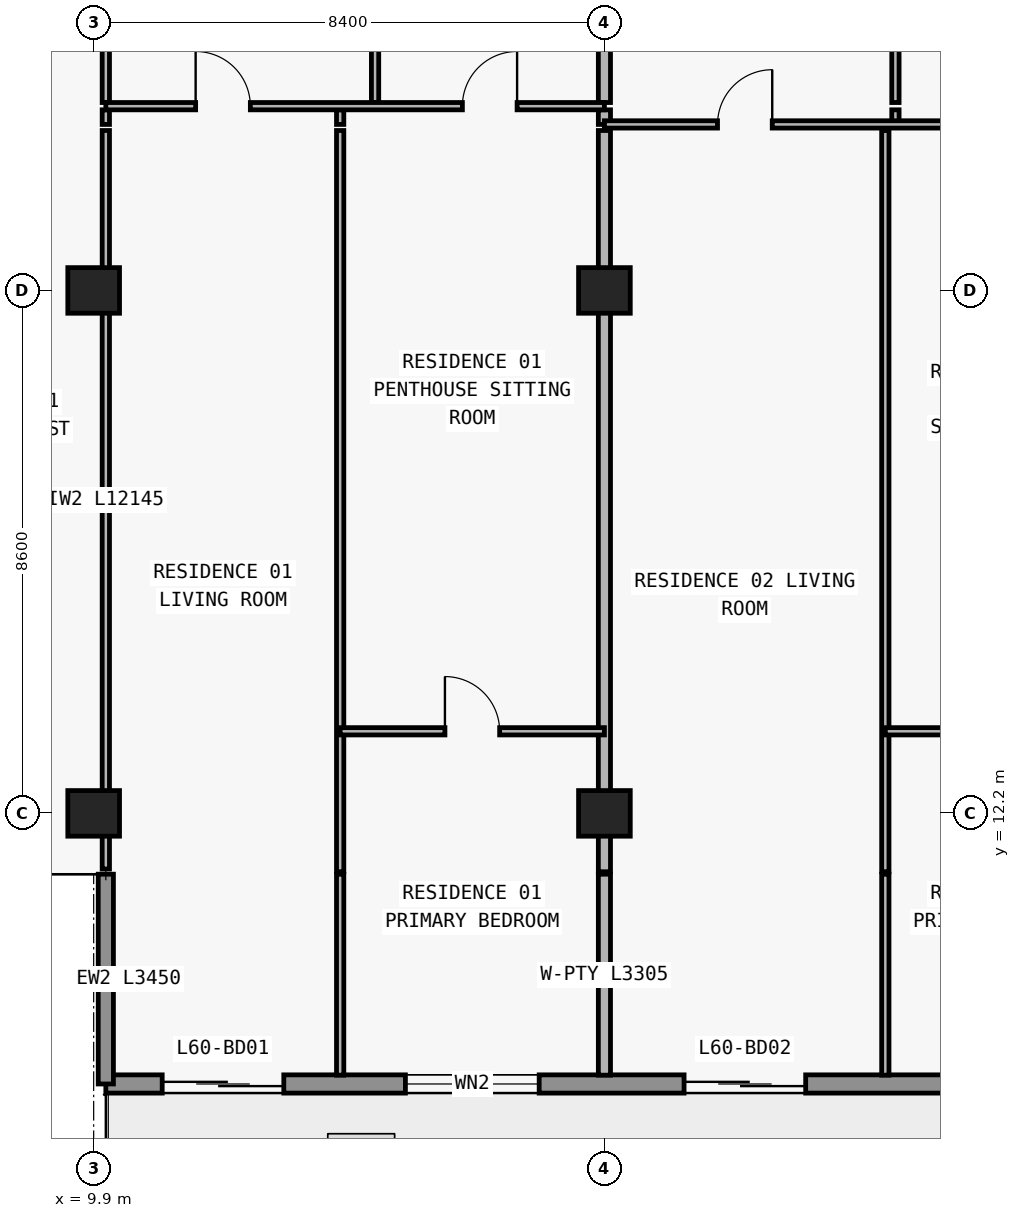
"""IFC4 building model, lengths in metres.
Left out: names, types, materials, properties, quantities, classifications, styles, units other than length and angle.
Written with IfcOpenShell. Run it as: python <this file> out.ifc"""

import sys

from ifc_helpers import new_model, si_unit, direction, frame, frame_2d, origin, origin_2d, place, context, subcontext, project, spatial, rectangle, extrude, element, fill, save


model = new_model("IFC4")
c1 = context("Model", 3, precision=1e-05, world=origin(), true_north=direction((0.0, 1.0)))
c2 = subcontext(c1, "Body", "Model", "MODEL_VIEW")
j1 = project(units=[si_unit("LENGTHUNIT", "METRE"), si_unit("PLANEANGLEUNIT", "RADIAN")], contexts=[c1])
p1 = place(None, origin())
s1 = spatial("IfcSite", under=j1, at=p1, CompositionType="ELEMENT")
p2 = place(p1, origin())
s2 = spatial("IfcBuilding", under=s1, at=p2, CompositionType="ELEMENT")
p3 = place(p2, frame((0.0, 0.0, 214.8)))
s3 = spatial("IfcBuildingStorey", under=s2, at=p3, CompositionType="ELEMENT", Elevation=214.8)
for number, where, z_axis, x_axis in (
    (1, (9.9, 12.2, 0.0), (0.0, 0.0, 1.0), (1.0, 0.0, 0.0)),
    (2, (18.3, 12.2, 0.0), (0.0, 0.0, 1.0), (1.0, 0.0, 0.0)),
    (3, (9.9, 20.8, 0.0), (0.0, 0.0, 1.0), (1.0, 0.0, 0.0)),
    (4, (18.3, 20.8, 0.0), (0.0, 0.0, 1.0), (1.0, 0.0, 0.0)),
):
    element("IfcColumn", number, at=place(p3, frame(where, z_axis=z_axis, x_axis=x_axis)), inside=s3, PredefinedType="COLUMN", context=c2, shape_type="SweptSolid", body=[
        extrude(rectangle(XDim=0.85, YDim=0.75, at=origin_2d()), origin(), (0.0, 0.0, 1.0), 3.05),
    ])
p4 = place(p3, frame((67.7, 7.75, 0.0), z_axis=(0.0, 0.0, 1.0), x_axis=(-1.0, 0.0, 0.0)))
e5 = element("IfcWall", 5, at=p4, inside=s3, PredefinedType="STANDARD", context=c2, shape_type="SweptSolid", body=[
    extrude(rectangle(XDim=57.6, YDim=0.3, at=frame_2d((28.8, 0.0))), origin(), (0.0, 0.0, 1.0), 3.05),
])
p5 = place(p4, frame((54.673, 0.0, 0.0)))
e6 = element("IfcOpeningElement", 6, at=p5, cuts=e5, PredefinedType="OPENING", context=c2, shape_type="SweptSolid", body=[
    extrude(rectangle(XDim=2.0, YDim=2.3, at=frame_2d((1.0, 1.15))), frame((0.0, 0.16, 0.0), z_axis=(0.0, -1.0, 0.0), x_axis=(1.0, 0.0, 0.0)), (0.0, 0.0, 1.0), 0.32),
])
p6 = place(p4, frame((50.473, 0.0, 0.85)))
e7 = element("IfcOpeningElement", 7, at=p6, cuts=e5, PredefinedType="OPENING", context=c2, shape_type="SweptSolid", body=[
    extrude(rectangle(XDim=2.2, YDim=1.55, at=frame_2d((1.1, 0.775))), frame((0.0, 0.16, 0.0), z_axis=(0.0, -1.0, 0.0), x_axis=(1.0, 0.0, 0.0)), (0.0, 0.0, 1.0), 0.32),
])
p7 = place(p4, frame((46.09, 0.0, 0.0)))
e8 = element("IfcOpeningElement", 8, at=p7, cuts=e5, PredefinedType="OPENING", context=c2, shape_type="SweptSolid", body=[
    extrude(rectangle(XDim=2.0, YDim=2.3, at=frame_2d((1.0, 1.15))), frame((0.0, 0.16, 0.0), z_axis=(0.0, -1.0, 0.0), x_axis=(1.0, 0.0, 0.0)), (0.0, 0.0, 1.0), 0.32),
])
p8 = place(p4, frame((41.99, 0.0, 0.85)))
e9 = element("IfcOpeningElement", 9, at=p8, cuts=e5, PredefinedType="OPENING", context=c2, shape_type="SweptSolid", body=[
    extrude(rectangle(XDim=1.8, YDim=1.55, at=frame_2d((0.9, 0.775))), frame((0.0, 0.16, 0.0), z_axis=(0.0, -1.0, 0.0), x_axis=(1.0, 0.0, 0.0)), (0.0, 0.0, 1.0), 0.32),
])
p9 = place(p4, frame((38.026, 0.0, 0.0)))
e10 = element("IfcOpeningElement", 10, at=p9, cuts=e5, PredefinedType="OPENING", context=c2, shape_type="SweptSolid", body=[
    extrude(rectangle(XDim=2.0, YDim=2.3, at=frame_2d((1.0, 1.15))), frame((0.0, 0.16, 0.0), z_axis=(0.0, -1.0, 0.0), x_axis=(1.0, 0.0, 0.0)), (0.0, 0.0, 1.0), 0.32),
])
p10 = place(p4, frame((33.726, 0.0, 0.85)))
e11 = element("IfcOpeningElement", 11, at=p10, cuts=e5, PredefinedType="OPENING", context=c2, shape_type="SweptSolid", body=[
    extrude(rectangle(XDim=2.2, YDim=1.55, at=frame_2d((1.1, 0.775))), frame((0.0, 0.16, 0.0), z_axis=(0.0, -1.0, 0.0), x_axis=(1.0, 0.0, 0.0)), (0.0, 0.0, 1.0), 0.32),
])
p11 = place(p4, frame((29.51, 0.0, 0.0)))
e12 = element("IfcOpeningElement", 12, at=p11, cuts=e5, PredefinedType="OPENING", context=c2, shape_type="SweptSolid", body=[
    extrude(rectangle(XDim=2.0, YDim=2.3, at=frame_2d((1.0, 1.15))), frame((0.0, 0.16, 0.0), z_axis=(0.0, -1.0, 0.0), x_axis=(1.0, 0.0, 0.0)), (0.0, 0.0, 1.0), 0.32),
])
p12 = place(p4, frame((25.81, 0.0, 0.85)))
e13 = element("IfcOpeningElement", 13, at=p12, cuts=e5, PredefinedType="OPENING", context=c2, shape_type="SweptSolid", body=[
    extrude(rectangle(XDim=1.8, YDim=1.55, at=frame_2d((0.9, 0.775))), frame((0.0, 0.16, 0.0), z_axis=(0.0, -1.0, 0.0), x_axis=(1.0, 0.0, 0.0)), (0.0, 0.0, 1.0), 0.32),
])
p13 = place(p4, frame((22.026, 0.0, 0.0)))
e14 = element("IfcOpeningElement", 14, at=p13, cuts=e5, PredefinedType="OPENING", context=c2, shape_type="SweptSolid", body=[
    extrude(rectangle(XDim=2.0, YDim=2.3, at=frame_2d((1.0, 1.15))), frame((0.0, 0.16, 0.0), z_axis=(0.0, -1.0, 0.0), x_axis=(1.0, 0.0, 0.0)), (0.0, 0.0, 1.0), 0.32),
])
p14 = place(p4, frame((17.726, 0.0, 0.85)))
e15 = element("IfcOpeningElement", 15, at=p14, cuts=e5, PredefinedType="OPENING", context=c2, shape_type="SweptSolid", body=[
    extrude(rectangle(XDim=2.2, YDim=1.55, at=frame_2d((1.1, 0.775))), frame((0.0, 0.16, 0.0), z_axis=(0.0, -1.0, 0.0), x_axis=(1.0, 0.0, 0.0)), (0.0, 0.0, 1.0), 0.32),
])
p15 = place(p4, frame((13.29, 0.0, 0.0)))
e16 = element("IfcOpeningElement", 16, at=p15, cuts=e5, PredefinedType="OPENING", context=c2, shape_type="SweptSolid", body=[
    extrude(rectangle(XDim=2.0, YDim=2.3, at=frame_2d((1.0, 1.15))), frame((0.0, 0.16, 0.0), z_axis=(0.0, -1.0, 0.0), x_axis=(1.0, 0.0, 0.0)), (0.0, 0.0, 1.0), 0.32),
])
p16 = place(p4, frame((9.19, 0.0, 0.85)))
e17 = element("IfcOpeningElement", 17, at=p16, cuts=e5, PredefinedType="OPENING", context=c2, shape_type="SweptSolid", body=[
    extrude(rectangle(XDim=1.8, YDim=1.55, at=frame_2d((0.9, 0.775))), frame((0.0, 0.16, 0.0), z_axis=(0.0, -1.0, 0.0), x_axis=(1.0, 0.0, 0.0)), (0.0, 0.0, 1.0), 0.32),
])
p17 = place(p4, frame((5.273, 0.0, 0.0)))
e18 = element("IfcOpeningElement", 18, at=p17, cuts=e5, PredefinedType="OPENING", context=c2, shape_type="SweptSolid", body=[
    extrude(rectangle(XDim=2.0, YDim=2.3, at=frame_2d((1.0, 1.15))), frame((0.0, 0.16, 0.0), z_axis=(0.0, -1.0, 0.0), x_axis=(1.0, 0.0, 0.0)), (0.0, 0.0, 1.0), 0.32),
])
p18 = place(p4, frame((1.073, 0.0, 0.85)))
e19 = element("IfcOpeningElement", 19, at=p18, cuts=e5, PredefinedType="OPENING", context=c2, shape_type="SweptSolid", body=[
    extrude(rectangle(XDim=2.2, YDim=1.55, at=frame_2d((1.1, 0.775))), frame((0.0, 0.16, 0.0), z_axis=(0.0, -1.0, 0.0), x_axis=(1.0, 0.0, 0.0)), (0.0, 0.0, 1.0), 0.32),
])
p19 = place(p3, frame((10.1, 11.2, 0.0), z_axis=(0.0, 0.0, 1.0), x_axis=(0.0, -1.0, 0.0)))
e20 = element("IfcWall", 20, at=p19, inside=s3, PredefinedType="ELEMENTEDWALL", context=c2, shape_type="SweptSolid", body=[
    extrude(rectangle(XDim=3.45, YDim=0.25, at=frame_2d((1.725, 0.0))), origin(), (0.0, 0.0, 1.0), 3.05),
])
p20 = place(p3, frame((10.1, 11.285, 0.0), z_axis=(0.0, 0.0, 1.0), x_axis=(0.0, 1.0, 0.0)))
e21 = element("IfcWall", 21, at=p20, inside=s3, PredefinedType="PARTITIONING", context=c2, shape_type="SweptSolid", body=[
    extrude(rectangle(XDim=12.145, YDim=0.12, at=frame_2d((6.073, 0.0))), origin(), (0.0, 0.0, 1.0), 2.263),
])
p21 = place(p3, frame((10.1, 23.53, 0.0), z_axis=(0.0, 0.0, 1.0), x_axis=(0.0, 1.0, 0.0)))
e22 = element("IfcWall", 22, at=p21, inside=s3, PredefinedType="PARTITIONING", context=c2, shape_type="SweptSolid", body=[
    extrude(rectangle(XDim=0.24, YDim=0.12, at=frame_2d((0.12, 0.0))), origin(), (0.0, 0.0, 1.0), 2.263),
])
p22 = place(p3, frame((10.1, 23.89, 0.0), z_axis=(0.0, 0.0, 1.0), x_axis=(0.0, 1.0, 0.0)))
e23 = element("IfcWall", 23, at=p22, inside=s3, PredefinedType="PARTITIONING", context=c2, shape_type="SweptSolid", body=[
    extrude(rectangle(XDim=4.69, YDim=0.12, at=frame_2d((2.345, 0.0))), origin(), (0.0, 0.0, 1.0), 2.263),
])
p23 = place(p22, frame((1.895, 0.0, 0.0)))
e24 = element("IfcOpeningElement", 24, at=p23, cuts=e23, PredefinedType="OPENING", context=c2, shape_type="SweptSolid", body=[
    extrude(rectangle(XDim=0.9, YDim=2.15, at=frame_2d((0.45, 1.075))), frame((0.0, 0.07, 0.0), z_axis=(0.0, -1.0, 0.0), x_axis=(1.0, 0.0, 0.0)), (0.0, 0.0, 1.0), 0.14),
])
p24 = place(p3, frame((13.954, 7.895, 0.0), z_axis=(0.0, 0.0, 1.0), x_axis=(0.0, 1.0, 0.0)))
e25 = element("IfcWall", 25, at=p24, inside=s3, PredefinedType="PARTITIONING", context=c2, shape_type="SweptSolid", body=[
    extrude(rectangle(XDim=3.305, YDim=0.12, at=frame_2d((1.652, 0.0))), origin(), (0.0, 0.0, 1.0), 3.05),
])
p25 = place(p3, frame((13.954, 11.24, 0.0), z_axis=(0.0, 0.0, 1.0), x_axis=(0.0, 1.0, 0.0)))
e26 = element("IfcWall", 26, at=p25, inside=s3, PredefinedType="PARTITIONING", context=c2, shape_type="SweptSolid", body=[
    extrude(rectangle(XDim=12.19, YDim=0.12, at=frame_2d((6.095, 0.0))), origin(), (0.0, 0.0, 1.0), 3.05),
])
p26 = place(p3, frame((13.954, 23.53, 0.0), z_axis=(0.0, 0.0, 1.0), x_axis=(0.0, 1.0, 0.0)))
e27 = element("IfcWall", 27, at=p26, inside=s3, PredefinedType="PARTITIONING", context=c2, shape_type="SweptSolid", body=[
    extrude(rectangle(XDim=0.24, YDim=0.12, at=frame_2d((0.12, 0.0))), origin(), (0.0, 0.0, 1.0), 3.05),
])
p27 = place(p3, frame((14.528, 23.89, 0.0), z_axis=(0.0, 0.0, 1.0), x_axis=(0.0, 1.0, 0.0)))
e28 = element("IfcWall", 28, at=p27, inside=s3, PredefinedType="PARTITIONING", context=c2, shape_type="SweptSolid", body=[
    extrude(rectangle(XDim=4.69, YDim=0.12, at=frame_2d((2.345, 0.0))), origin(), (0.0, 0.0, 1.0), 3.05),
])
p28 = place(p27, frame((1.895, 0.0, 0.0)))
e29 = element("IfcOpeningElement", 29, at=p28, cuts=e28, PredefinedType="OPENING", context=c2, shape_type="SweptSolid", body=[
    extrude(rectangle(XDim=0.9, YDim=2.15, at=frame_2d((0.45, 1.075))), frame((0.0, 0.07, 0.0), z_axis=(0.0, -1.0, 0.0), x_axis=(1.0, 0.0, 0.0)), (0.0, 0.0, 1.0), 0.14),
])
p29 = place(p3, frame((18.3, 7.895, 0.0), z_axis=(0.0, 0.0, 1.0), x_axis=(0.0, 1.0, 0.0)))
e30 = element("IfcWall", 30, at=p29, inside=s3, PredefinedType="PARTITIONING", context=c2, shape_type="SweptSolid", body=[
    extrude(rectangle(XDim=3.305, YDim=0.2, at=frame_2d((1.652, 0.0))), origin(), (0.0, 0.0, 1.0), 3.05),
])
p30 = place(p3, frame((18.3, 11.24, 0.0), z_axis=(0.0, 0.0, 1.0), x_axis=(0.0, 1.0, 0.0)))
e31 = element("IfcWall", 31, at=p30, inside=s3, PredefinedType="PARTITIONING", context=c2, shape_type="SweptSolid", body=[
    extrude(rectangle(XDim=12.19, YDim=0.2, at=frame_2d((6.095, 0.0))), origin(), (0.0, 0.0, 1.0), 2.263),
])
p31 = place(p3, frame((18.3, 23.53, 0.0), z_axis=(0.0, 0.0, 1.0), x_axis=(0.0, 1.0, 0.0)))
e32 = element("IfcWall", 32, at=p31, inside=s3, PredefinedType="PARTITIONING", context=c2, shape_type="SweptSolid", body=[
    extrude(rectangle(XDim=0.24, YDim=0.2, at=frame_2d((0.12, 0.0))), origin(), (0.0, 0.0, 1.0), 2.263),
])
p32 = place(p3, frame((18.3, 23.89, 0.0), z_axis=(0.0, 0.0, 1.0), x_axis=(0.0, 1.0, 0.0)))
e33 = element("IfcWall", 33, at=p32, inside=s3, PredefinedType="PARTITIONING", context=c2, shape_type="SweptSolid", body=[
    extrude(rectangle(XDim=4.69, YDim=0.2, at=frame_2d((2.345, 0.0))), origin(), (0.0, 0.0, 1.0), 2.263),
])
p33 = place(p3, frame((22.92, 7.895, 0.0), z_axis=(0.0, 0.0, 1.0), x_axis=(0.0, 1.0, 0.0)))
e34 = element("IfcWall", 34, at=p33, inside=s3, PredefinedType="PARTITIONING", context=c2, shape_type="SweptSolid", body=[
    extrude(rectangle(XDim=3.305, YDim=0.12, at=frame_2d((1.652, 0.0))), origin(), (0.0, 0.0, 1.0), 3.05),
])
p34 = place(p3, frame((22.92, 11.24, 0.0), z_axis=(0.0, 0.0, 1.0), x_axis=(0.0, 1.0, 0.0)))
e35 = element("IfcWall", 35, at=p34, inside=s3, PredefinedType="PARTITIONING", context=c2, shape_type="SweptSolid", body=[
    extrude(rectangle(XDim=12.19, YDim=0.12, at=frame_2d((6.095, 0.0))), origin(), (0.0, 0.0, 1.0), 3.05),
])
p35 = place(p3, frame((23.086, 23.53, 0.0), z_axis=(0.0, 0.0, 1.0), x_axis=(0.0, 1.0, 0.0)))
e36 = element("IfcWall", 36, at=p35, inside=s3, PredefinedType="PARTITIONING", context=c2, shape_type="SweptSolid", body=[
    extrude(rectangle(XDim=0.24, YDim=0.12, at=frame_2d((0.12, 0.0))), origin(), (0.0, 0.0, 1.0), 3.05),
])
p36 = place(p3, frame((23.086, 23.89, 0.0), z_axis=(0.0, 0.0, 1.0), x_axis=(0.0, 1.0, 0.0)))
e37 = element("IfcWall", 37, at=p36, inside=s3, PredefinedType="PARTITIONING", context=c2, shape_type="SweptSolid", body=[
    extrude(rectangle(XDim=4.69, YDim=0.12, at=frame_2d((2.345, 0.0))), origin(), (0.0, 0.0, 1.0), 3.05),
])
p37 = place(p36, frame((1.895, 0.0, 0.0)))
e38 = element("IfcOpeningElement", 38, at=p37, cuts=e37, PredefinedType="OPENING", context=c2, shape_type="SweptSolid", body=[
    extrude(rectangle(XDim=0.9, YDim=2.15, at=frame_2d((0.45, 1.075))), frame((0.0, 0.07, 0.0), z_axis=(0.0, -1.0, 0.0), x_axis=(1.0, 0.0, 0.0)), (0.0, 0.0, 1.0), 0.14),
])
p38 = place(p3, frame((13.954, 13.55, 0.0), z_axis=(0.0, 0.0, 1.0), x_axis=(1.0, 0.0, 0.0)))
e39 = element("IfcWall", 39, at=p38, inside=s3, PredefinedType="PARTITIONING", context=c2, shape_type="SweptSolid", body=[
    extrude(rectangle(XDim=4.346, YDim=0.12, at=frame_2d((2.173, 0.0))), origin(), (0.0, 0.0, 1.0), 3.05),
])
p39 = place(p38, frame((1.723, 0.0, 0.0)))
e40 = element("IfcOpeningElement", 40, at=p39, cuts=e39, PredefinedType="OPENING", context=c2, shape_type="SweptSolid", body=[
    extrude(rectangle(XDim=0.9, YDim=2.15, at=frame_2d((0.45, 1.075))), frame((0.0, 0.07, 0.0), z_axis=(0.0, -1.0, 0.0), x_axis=(1.0, 0.0, 0.0)), (0.0, 0.0, 1.0), 0.14),
])
p40 = place(p3, frame((22.92, 13.55, 0.0), z_axis=(0.0, 0.0, 1.0), x_axis=(1.0, 0.0, 0.0)))
e41 = element("IfcWall", 41, at=p40, inside=s3, PredefinedType="PARTITIONING", context=c2, shape_type="SweptSolid", body=[
    extrude(rectangle(XDim=3.78, YDim=0.12, at=frame_2d((1.89, 0.0))), origin(), (0.0, 0.0, 1.0), 3.05),
])
p41 = place(p40, frame((1.44, 0.0, 0.0)))
e42 = element("IfcOpeningElement", 42, at=p41, cuts=e41, PredefinedType="OPENING", context=c2, shape_type="SweptSolid", body=[
    extrude(rectangle(XDim=0.9, YDim=2.15, at=frame_2d((0.45, 1.075))), frame((0.0, 0.07, 0.0), z_axis=(0.0, -1.0, 0.0), x_axis=(1.0, 0.0, 0.0)), (0.0, 0.0, 1.0), 0.14),
])
p42 = place(p3, frame((18.3, 23.53, 0.0), z_axis=(0.0, 0.0, 1.0), x_axis=(1.0, 0.0, 0.0)))
e43 = element("IfcWall", 43, at=p42, inside=s3, PredefinedType="PARTITIONING", context=c2, shape_type="SweptSolid", body=[
    extrude(rectangle(XDim=8.18, YDim=0.12, at=frame_2d((4.09, 0.0))), origin(), (0.0, 0.0, 1.0), 3.05),
])
p43 = place(p42, frame((1.86, 0.0, 0.0)))
e44 = element("IfcOpeningElement", 44, at=p43, cuts=e43, PredefinedType="OPENING", context=c2, shape_type="SweptSolid", body=[
    extrude(rectangle(XDim=0.9, YDim=2.15, at=frame_2d((0.45, 1.075))), frame((0.0, 0.07, 0.0), z_axis=(0.0, -1.0, 0.0), x_axis=(1.0, 0.0, 0.0)), (0.0, 0.0, 1.0), 0.14),
])
p44 = place(p42, frame((6.033, 0.0, 0.0)))
e45 = element("IfcOpeningElement", 45, at=p44, cuts=e43, PredefinedType="OPENING", context=c2, shape_type="SweptSolid", body=[
    extrude(rectangle(XDim=0.9, YDim=2.15, at=frame_2d((0.45, 1.075))), frame((0.0, 0.07, 0.0), z_axis=(0.0, -1.0, 0.0), x_axis=(1.0, 0.0, 0.0)), (0.0, 0.0, 1.0), 0.14),
])
p45 = place(p3, frame((10.1, 23.83, 0.0), z_axis=(0.0, 0.0, 1.0), x_axis=(1.0, 0.0, 0.0)))
e46 = element("IfcWall", 46, at=p45, inside=s3, PredefinedType="PARTITIONING", context=c2, shape_type="SweptSolid", body=[
    extrude(rectangle(XDim=8.2, YDim=0.12, at=frame_2d((4.1, 0.0))), origin(), (0.0, 0.0, 1.0), 3.05),
])
p46 = place(p45, frame((1.477, 0.0, 0.0)))
e47 = element("IfcOpeningElement", 47, at=p46, cuts=e46, PredefinedType="OPENING", context=c2, shape_type="SweptSolid", body=[
    extrude(rectangle(XDim=0.9, YDim=2.15, at=frame_2d((0.45, 1.075))), frame((0.0, 0.07, 0.0), z_axis=(0.0, -1.0, 0.0), x_axis=(1.0, 0.0, 0.0)), (0.0, 0.0, 1.0), 0.14),
])
p47 = place(p45, frame((5.864, 0.0, 0.0)))
e48 = element("IfcOpeningElement", 48, at=p47, cuts=e46, PredefinedType="OPENING", context=c2, shape_type="SweptSolid", body=[
    extrude(rectangle(XDim=0.9, YDim=2.15, at=frame_2d((0.45, 1.075))), frame((0.0, 0.07, 0.0), z_axis=(0.0, -1.0, 0.0), x_axis=(1.0, 0.0, 0.0)), (0.0, 0.0, 1.0), 0.14),
])
p48 = place(p5, origin())
e49 = element("IfcDoor", 49, at=p48, inside=s3, OperationType="DOUBLE_DOOR_SLIDING", PredefinedType="DOOR", context=c2, shape_type="SweptSolid", body=[
    extrude(rectangle(XDim=2.0, YDim=2.3, at=frame_2d((1.0, 1.15))), frame((0.0, 0.025, 0.0), z_axis=(0.0, -1.0, 0.0), x_axis=(1.0, 0.0, 0.0)), (0.0, 0.0, 1.0), 0.05),
])
fill(e6, e49)
p49 = place(p6, origin())
e50 = element("IfcWindow", 50, at=p49, inside=s3, PartitioningType="SINGLE_PANEL", PredefinedType="WINDOW", context=c2, shape_type="SweptSolid", body=[
    extrude(rectangle(XDim=2.2, YDim=1.55, at=frame_2d((1.1, 0.775))), frame((0.0, 0.03, 0.0), z_axis=(0.0, -1.0, 0.0), x_axis=(1.0, 0.0, 0.0)), (0.0, 0.0, 1.0), 0.06),
])
fill(e7, e50)
p50 = place(p7, origin())
e51 = element("IfcDoor", 51, at=p50, inside=s3, OperationType="DOUBLE_DOOR_SLIDING", PredefinedType="DOOR", context=c2, shape_type="SweptSolid", body=[
    extrude(rectangle(XDim=2.0, YDim=2.3, at=frame_2d((1.0, 1.15))), frame((0.0, 0.025, 0.0), z_axis=(0.0, -1.0, 0.0), x_axis=(1.0, 0.0, 0.0)), (0.0, 0.0, 1.0), 0.05),
])
fill(e8, e51)
p51 = place(p46, origin())
e52 = element("IfcDoor", 52, at=p51, inside=s3, OperationType="SINGLE_SWING_LEFT", PredefinedType="DOOR", context=c2, shape_type="SweptSolid", body=[
    extrude(rectangle(XDim=0.9, YDim=2.15, at=frame_2d((0.45, 1.075))), frame((0.0, 0.025, 0.0), z_axis=(0.0, -1.0, 0.0), x_axis=(1.0, 0.0, 0.0)), (0.0, 0.0, 1.0), 0.05),
])
fill(e47, e52)
p52 = place(p47, origin())
e53 = element("IfcDoor", 53, at=p52, inside=s3, OperationType="SINGLE_SWING_RIGHT", PredefinedType="DOOR", context=c2, shape_type="SweptSolid", body=[
    extrude(rectangle(XDim=0.9, YDim=2.15, at=frame_2d((0.45, 1.075))), frame((0.0, 0.025, 0.0), z_axis=(0.0, -1.0, 0.0), x_axis=(1.0, 0.0, 0.0)), (0.0, 0.0, 1.0), 0.05),
])
fill(e48, e53)
p53 = place(p39, origin())
e54 = element("IfcDoor", 54, at=p53, inside=s3, OperationType="SINGLE_SWING_LEFT", PredefinedType="DOOR", context=c2, shape_type="SweptSolid", body=[
    extrude(rectangle(XDim=0.9, YDim=2.15, at=frame_2d((0.45, 1.075))), frame((0.0, 0.025, 0.0), z_axis=(0.0, -1.0, 0.0), x_axis=(1.0, 0.0, 0.0)), (0.0, 0.0, 1.0), 0.05),
])
fill(e40, e54)
p54 = place(p43, origin())
e55 = element("IfcDoor", 55, at=p54, inside=s3, OperationType="SINGLE_SWING_RIGHT", PredefinedType="DOOR", context=c2, shape_type="SweptSolid", body=[
    extrude(rectangle(XDim=0.9, YDim=2.15, at=frame_2d((0.45, 1.075))), frame((0.0, 0.025, 0.0), z_axis=(0.0, -1.0, 0.0), x_axis=(1.0, 0.0, 0.0)), (0.0, 0.0, 1.0), 0.05),
])
fill(e44, e55)
save(model, sys.argv[1])
